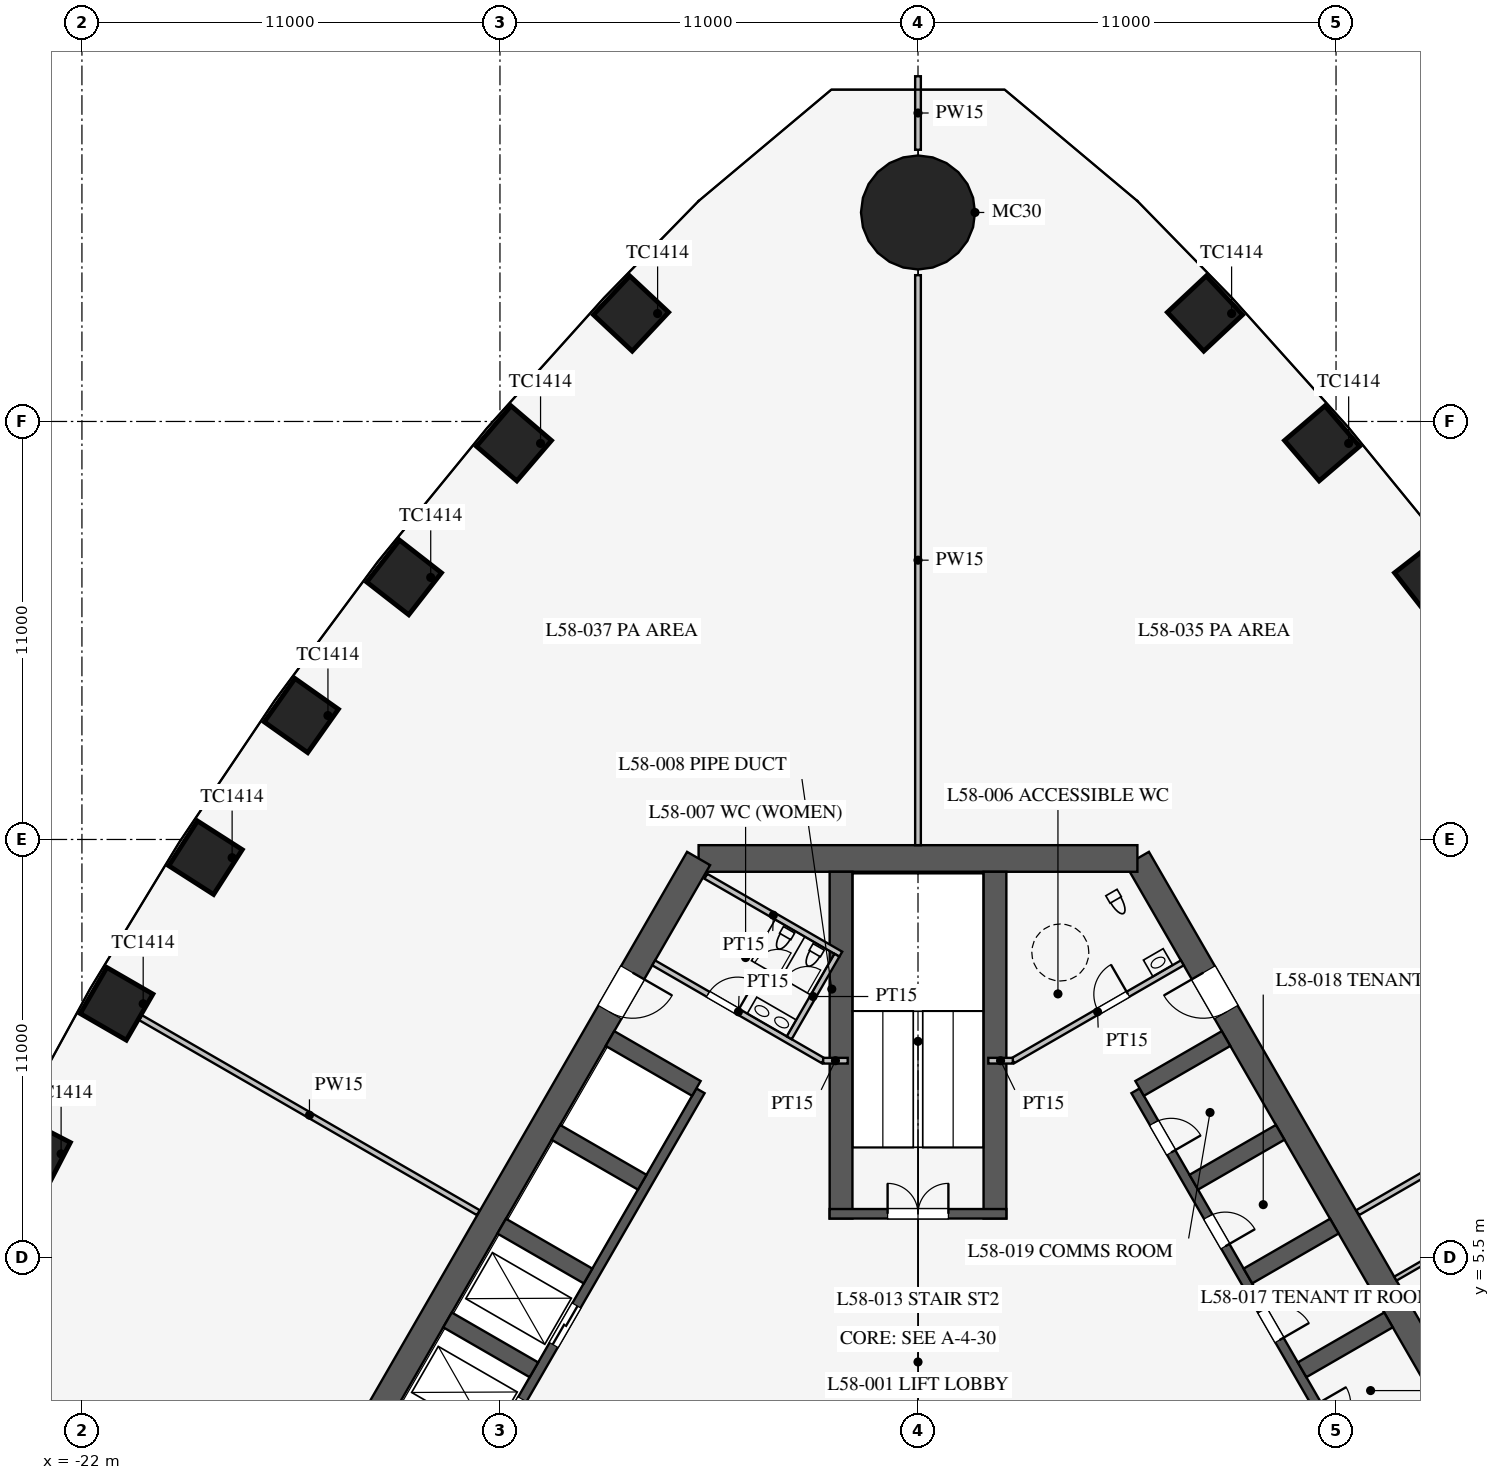
"""IFC4 building model, lengths in metres.
Left out: names, types, materials, properties, quantities, classifications, styles, units other than length and angle.
Written with IfcOpenShell. Run it as: python <this file> out.ifc"""

import sys

from ifc_helpers import new_model, si_unit, direction, frame, frame_2d, origin, origin_2d, place, context, subcontext, project, spatial, rectangle, circle, extrude, element, fill, save


model = new_model("IFC4")
c1 = context("Model", 3, precision=1e-05, world=origin(), true_north=direction((0.0, 1.0)))
c2 = subcontext(c1, "Body", "Model", "MODEL_VIEW")
j1 = project(units=[si_unit("LENGTHUNIT", "METRE"), si_unit("PLANEANGLEUNIT", "RADIAN")], contexts=[c1])
p1 = place(None, origin())
s1 = spatial("IfcSite", under=j1, at=p1, CompositionType="ELEMENT")
p2 = place(p1, origin())
s2 = spatial("IfcBuilding", under=s1, at=p2, CompositionType="ELEMENT")
p3 = place(p2, frame((0.0, 0.0, 252.7)))
s3 = spatial("IfcBuildingStorey", under=s2, at=p3, CompositionType="ELEMENT", Elevation=252.7)
for number, where, z_axis, x_axis in (
    (1, (13.522, 23.396, 0.0), (0.0, 0.0, 1.0), (-0.615, 0.789, 0.0)),
    (2, (10.632, 26.923, 0.0), (0.0, 0.0, 1.0), (-0.651, 0.759, 0.0)),
    (3, (7.552, 30.341, 0.0), (0.0, 0.0, 1.0), (-0.684, 0.73, 0.0)),
    (4, (-7.552, 30.341, 0.0), (0.0, 0.0, 1.0), (-0.684, -0.73, 0.0)),
    (5, (-10.632, 26.923, 0.0), (0.0, 0.0, 1.0), (-0.651, -0.759, 0.0)),
    (6, (-13.522, 23.396, 0.0), (0.0, 0.0, 1.0), (-0.615, -0.789, 0.0)),
    (7, (-16.227, 19.761, 0.0), (0.0, 0.0, 1.0), (-0.577, -0.816, 0.0)),
    (8, (-18.748, 16.02, 0.0), (0.0, 0.0, 1.0), (-0.539, -0.842, 0.0)),
    (9, (-21.088, 12.175, 0.0), (0.0, 0.0, 1.0), (-0.5, -0.866, 0.0)),
    (10, (-23.248, 8.226, 0.0), (0.0, 0.0, 1.0), (-0.46, -0.888, 0.0)),
):
    element("IfcColumn", number, at=place(p3, frame(where, z_axis=z_axis, x_axis=x_axis)), inside=s3, PredefinedType="COLUMN", context=c2, shape_type="SweptSolid", body=[
        extrude(rectangle(XDim=1.4, YDim=1.4, at=origin_2d()), origin(), (0.0, 0.0, 1.0), 4.2),
    ])
p4 = place(p3, frame((0.0, 33.0, 0.0), z_axis=(0.0, 0.0, 1.0), x_axis=(1.0, 0.0, 0.0)))
e11 = element("IfcColumn", 11, at=p4, inside=s3, PredefinedType="COLUMN", context=c2, shape_type="SweptSolid", body=[
    extrude(circle(Radius=1.5, at=origin_2d()), origin(), (0.0, 0.0, 1.0), 4.2),
])
p5 = place(p3, frame((16.743, -3.0, 0.0), z_axis=(0.0, 0.0, 1.0), x_axis=(-0.500002442456, 0.866023993627, 0.0)))
e12 = element("IfcWall", 12, at=p5, inside=s3, PredefinedType="SHEAR", context=c2, shape_type="SweptSolid", body=[
    extrude(rectangle(XDim=21.939, YDim=0.7, at=frame_2d((10.97, 0.0))), origin(), (0.0, 0.0, 1.0), 4.2),
])
p6 = place(p5, frame((17.27, 0.0, 0.0)))
e13 = element("IfcOpeningElement", 13, at=p6, cuts=e12, PredefinedType="OPENING", context=c2, shape_type="SweptSolid", body=[
    extrude(rectangle(XDim=1.2, YDim=2.1, at=frame_2d((0.6, 1.05))), frame((0.0, 0.36, 0.0), z_axis=(0.0, -1.0, 0.0), x_axis=(1.0, 0.0, 0.0)), (0.0, 0.0, 1.0), 0.72),
])
p7 = place(p5, frame((3.47, 0.0, 0.0)))
e14 = element("IfcOpeningElement", 14, at=p7, cuts=e12, PredefinedType="OPENING", context=c2, shape_type="SweptSolid", body=[
    extrude(rectangle(XDim=1.2, YDim=2.1, at=frame_2d((0.6, 1.05))), frame((0.0, 0.36, 0.0), z_axis=(0.0, -1.0, 0.0), x_axis=(1.0, 0.0, 0.0)), (0.0, 0.0, 1.0), 0.72),
])
p8 = place(p3, frame((5.773, 16.0, 0.0), z_axis=(0.0, 0.0, 1.0), x_axis=(-1.0, 0.0, 0.0)))
e15 = element("IfcWall", 15, at=p8, inside=s3, PredefinedType="SHEAR", context=c2, shape_type="SweptSolid", body=[
    extrude(rectangle(XDim=11.547, YDim=0.7, at=frame_2d((5.773, 0.0))), origin(), (0.0, 0.0, 1.0), 4.2),
])
p9 = place(p3, frame((-5.773, 16.0, 0.0), z_axis=(0.0, 0.0, 1.0), x_axis=(-0.500002442456, -0.866023993627, 0.0)))
e16 = element("IfcWall", 16, at=p9, inside=s3, PredefinedType="SHEAR", context=c2, shape_type="SweptSolid", body=[
    extrude(rectangle(XDim=21.939, YDim=0.7, at=frame_2d((10.97, 0.0))), origin(), (0.0, 0.0, 1.0), 4.2),
])
p10 = place(p9, frame((17.27, 0.0, 0.0)))
e17 = element("IfcOpeningElement", 17, at=p10, cuts=e16, PredefinedType="OPENING", context=c2, shape_type="SweptSolid", body=[
    extrude(rectangle(XDim=1.2, YDim=2.1, at=frame_2d((0.6, 1.05))), frame((0.0, 0.36, 0.0), z_axis=(0.0, -1.0, 0.0), x_axis=(1.0, 0.0, 0.0)), (0.0, 0.0, 1.0), 0.72),
])
p11 = place(p9, frame((3.47, 0.0, 0.0)))
e18 = element("IfcOpeningElement", 18, at=p11, cuts=e16, PredefinedType="OPENING", context=c2, shape_type="SweptSolid", body=[
    extrude(rectangle(XDim=1.2, YDim=2.1, at=frame_2d((0.6, 1.05))), frame((0.0, 0.36, 0.0), z_axis=(0.0, -1.0, 0.0), x_axis=(1.0, 0.0, 0.0)), (0.0, 0.0, 1.0), 0.72),
])
p12 = place(p3, frame((11.424, 0.014, 0.0), z_axis=(0.0, 0.0, 1.0), x_axis=(-0.500001763848, 0.866024385424, 0.0)))
e19 = element("IfcWall", 19, at=p12, inside=s3, PredefinedType="SHEAR", context=c2, shape_type="SweptSolid", body=[
    extrude(rectangle(XDim=11.4, YDim=0.25, at=frame_2d((5.7, 0.0))), origin(), (0.0, 0.0, 1.0), 4.2),
])
p13 = place(p12, frame((0.975, 0.0, 0.0)))
e20 = element("IfcOpeningElement", 20, at=p13, cuts=e19, PredefinedType="OPENING", context=c2, shape_type="SweptSolid", body=[
    extrude(rectangle(XDim=0.9, YDim=2.1, at=frame_2d((0.45, 1.05))), frame((0.0, 0.135, 0.0), z_axis=(0.0, -1.0, 0.0), x_axis=(1.0, 0.0, 0.0)), (0.0, 0.0, 1.0), 0.27),
])
p14 = place(p12, frame((3.825, 0.0, 0.0)))
e21 = element("IfcOpeningElement", 21, at=p14, cuts=e19, PredefinedType="OPENING", context=c2, shape_type="SweptSolid", body=[
    extrude(rectangle(XDim=0.9, YDim=2.1, at=frame_2d((0.45, 1.05))), frame((0.0, 0.135, 0.0), z_axis=(0.0, -1.0, 0.0), x_axis=(1.0, 0.0, 0.0)), (0.0, 0.0, 1.0), 0.27),
])
p15 = place(p12, frame((6.675, 0.0, 0.0)))
e22 = element("IfcOpeningElement", 22, at=p15, cuts=e19, PredefinedType="OPENING", context=c2, shape_type="SweptSolid", body=[
    extrude(rectangle(XDim=0.9, YDim=2.1, at=frame_2d((0.45, 1.05))), frame((0.0, 0.135, 0.0), z_axis=(0.0, -1.0, 0.0), x_axis=(1.0, 0.0, 0.0)), (0.0, 0.0, 1.0), 0.27),
])
p16 = place(p12, frame((9.525, 0.0, 0.0)))
e23 = element("IfcOpeningElement", 23, at=p16, cuts=e19, PredefinedType="OPENING", context=c2, shape_type="SweptSolid", body=[
    extrude(rectangle(XDim=0.9, YDim=2.1, at=frame_2d((0.45, 1.05))), frame((0.0, 0.135, 0.0), z_axis=(0.0, -1.0, 0.0), x_axis=(1.0, 0.0, 0.0)), (0.0, 0.0, 1.0), 0.27),
])
for number, where, z_axis, x_axis in (
    (24, (10.107, 2.544, 0.0), (0.0, 0.0, 1.0), (0.866, 0.5, 0.0)),
    (25, (8.682, 5.012, 0.0), (0.0, 0.0, 1.0), (0.866, 0.5, 0.0)),
    (26, (7.257, 7.481, 0.0), (0.0, 0.0, 1.0), (0.866, 0.5, 0.0)),
    (27, (5.832, 9.949, 0.0), (0.0, 0.0, 1.0), (0.866, 0.5, 0.0)),
):
    element("IfcWall", number, at=place(p3, frame(where, z_axis=z_axis, x_axis=x_axis)), inside=s3, PredefinedType="SHEAR", context=c2, shape_type="SweptSolid", body=[
        extrude(rectangle(XDim=2.625, YDim=0.45, at=frame_2d((1.312, 0.0))), origin(), (0.0, 0.0, 1.0), 4.2),
    ])
p17 = place(p3, frame((-5.724, 9.886, 0.0), z_axis=(0.0, 0.0, 1.0), x_axis=(-0.500001763848, -0.866024385424, 0.0)))
e28 = element("IfcWall", 28, at=p17, inside=s3, PredefinedType="SHEAR", context=c2, shape_type="SweptSolid", body=[
    extrude(rectangle(XDim=11.4, YDim=0.25, at=frame_2d((5.7, 0.0))), origin(), (0.0, 0.0, 1.0), 4.2),
])
p18 = place(p17, frame((6.525, 0.0, 0.0)))
e29 = element("IfcOpeningElement", 29, at=p18, cuts=e28, PredefinedType="OPENING", context=c2, shape_type="SweptSolid", body=[
    extrude(rectangle(XDim=1.2, YDim=2.2, at=frame_2d((0.6, 1.1))), frame((0.0, 0.135, 0.0), z_axis=(0.0, -1.0, 0.0), x_axis=(1.0, 0.0, 0.0)), (0.0, 0.0, 1.0), 0.27),
])
p19 = place(p17, frame((9.375, 0.0, 0.0)))
e30 = element("IfcOpeningElement", 30, at=p19, cuts=e28, PredefinedType="OPENING", context=c2, shape_type="SweptSolid", body=[
    extrude(rectangle(XDim=1.2, YDim=2.2, at=frame_2d((0.6, 1.1))), frame((0.0, 0.135, 0.0), z_axis=(0.0, -1.0, 0.0), x_axis=(1.0, 0.0, 0.0)), (0.0, 0.0, 1.0), 0.27),
])
for number, where, z_axis, x_axis in (
    (31, (-5.832, 9.949, 0.0), (0.0, 0.0, 1.0), (-0.866, 0.5, 0.0)),
    (32, (-7.257, 7.481, 0.0), (0.0, 0.0, 1.0), (-0.866, 0.5, 0.0)),
    (33, (-8.682, 5.012, 0.0), (0.0, 0.0, 1.0), (-0.866, 0.5, 0.0)),
    (34, (-10.107, 2.544, 0.0), (0.0, 0.0, 1.0), (-0.866, 0.5, 0.0)),
):
    element("IfcWall", number, at=place(p3, frame(where, z_axis=z_axis, x_axis=x_axis)), inside=s3, PredefinedType="SHEAR", context=c2, shape_type="SweptSolid", body=[
        extrude(rectangle(XDim=2.625, YDim=0.45, at=frame_2d((1.312, 0.0))), origin(), (0.0, 0.0, 1.0), 4.2),
    ])
for number, where, z_axis, x_axis in (
    (35, (2.025, 6.525, 0.0), (0.0, 0.0, 1.0), (0.0, 1.0, 0.0)),
    (36, (-2.025, 6.525, 0.0), (0.0, 0.0, 1.0), (0.0, 1.0, 0.0)),
):
    element("IfcWall", number, at=place(p3, frame(where, z_axis=z_axis, x_axis=x_axis)), inside=s3, PredefinedType="SHEAR", context=c2, shape_type="SweptSolid", body=[
        extrude(rectangle(XDim=9.125, YDim=0.6, at=frame_2d((4.562, 0.0))), origin(), (0.0, 0.0, 1.0), 4.2),
    ])
p20 = place(p3, frame((2.325, 6.65, 0.0), z_axis=(0.0, 0.0, 1.0), x_axis=(-1.0, 0.0, 0.0)))
e37 = element("IfcWall", 37, at=p20, inside=s3, PredefinedType="SHEAR", context=c2, shape_type="SweptSolid", body=[
    extrude(rectangle(XDim=4.65, YDim=0.25, at=frame_2d((2.325, 0.0))), origin(), (0.0, 0.0, 1.0), 4.2),
])
p21 = place(p20, frame((1.525, 0.0, 0.0)))
e38 = element("IfcOpeningElement", 38, at=p21, cuts=e37, PredefinedType="OPENING", context=c2, shape_type="SweptSolid", body=[
    extrude(rectangle(XDim=1.6, YDim=2.1, at=frame_2d((0.8, 1.05))), frame((0.0, 0.135, 0.0), z_axis=(0.0, -1.0, 0.0), x_axis=(1.0, 0.0, 0.0)), (0.0, 0.0, 1.0), 0.27),
])
p22 = place(p3, frame((2.495, 10.678, 0.0), z_axis=(0.0, 0.0, 1.0), x_axis=(0.866037967349, 0.499978238636, 0.0)))
e39 = element("IfcWall", 39, at=p22, inside=s3, PredefinedType="PARTITIONING", context=c2, shape_type="SweptSolid", body=[
    extrude(rectangle(XDim=5.15, YDim=0.15, at=frame_2d((2.575, 0.0))), origin(), (0.0, 0.0, 1.0), 4.0),
])
p23 = place(p22, frame((2.6, 0.0, 0.0)))
e40 = element("IfcOpeningElement", 40, at=p23, cuts=e39, PredefinedType="OPENING", context=c2, shape_type="SweptSolid", body=[
    extrude(rectangle(XDim=0.9, YDim=2.1, at=frame_2d((0.45, 1.05))), frame((0.0, 0.085, 0.0), z_axis=(0.0, -1.0, 0.0), x_axis=(1.0, 0.0, 0.0)), (0.0, 0.0, 1.0), 0.17),
])
p24 = place(p3, frame((-2.495, 10.678, 0.0), z_axis=(0.0, 0.0, 1.0), x_axis=(-0.866037967349, 0.499978238636, 0.0)))
e41 = element("IfcWall", 41, at=p24, inside=s3, PredefinedType="PARTITIONING", context=c2, shape_type="SweptSolid", body=[
    extrude(rectangle(XDim=5.15, YDim=0.15, at=frame_2d((2.575, 0.0))), origin(), (0.0, 0.0, 1.0), 4.0),
])
p25 = place(p24, frame((2.6, 0.0, 0.0)))
e42 = element("IfcOpeningElement", 42, at=p25, cuts=e41, PredefinedType="OPENING", context=c2, shape_type="SweptSolid", body=[
    extrude(rectangle(XDim=0.9, YDim=2.1, at=frame_2d((0.45, 1.05))), frame((0.0, 0.085, 0.0), z_axis=(0.0, -1.0, 0.0), x_axis=(1.0, 0.0, 0.0)), (0.0, 0.0, 1.0), 0.17),
])
for number, where, z_axis, x_axis in (
    (43, (2.495, 10.678, 0.0), (0.0, 0.0, 1.0), (-1.0, 0.0, 0.0)),
    (44, (-2.495, 10.678, 0.0), (0.0, 0.0, 1.0), (1.0, 0.0, 0.0)),
):
    element("IfcWall", number, at=place(p3, frame(where, z_axis=z_axis, x_axis=x_axis)), inside=s3, PredefinedType="PARTITIONING", context=c2, shape_type="SweptSolid", body=[
        extrude(rectangle(XDim=0.645, YDim=0.15, at=frame_2d((0.323, 0.0))), origin(), (0.0, 0.0, 1.0), 4.0),
    ])
p26 = place(p3, frame((-2.031, 13.482, 0.0), z_axis=(0.0, 0.0, 1.0), x_axis=(-0.866050731258, 0.499956128963, 0.0)))
e45 = element("IfcWall", 45, at=p26, inside=s3, PredefinedType="PARTITIONING", context=c2, shape_type="SweptSolid", body=[
    extrude(rectangle(XDim=4.1, YDim=0.15, at=frame_2d((2.05, 0.0))), origin(), (0.0, 0.0, 1.0), 4.0),
])
p27 = place(p3, frame((-3.389, 11.281, 0.0), z_axis=(0.0, 0.0, 1.0), x_axis=(0.499989096993, 0.866031698547, 0.0)))
e46 = element("IfcWall", 46, at=p27, inside=s3, PredefinedType="PARTITIONING", context=c2, shape_type="SweptSolid", body=[
    extrude(rectangle(XDim=2.51, YDim=0.15, at=frame_2d((1.255, 0.0))), origin(), (0.0, 0.0, 1.0), 4.0),
])
p28 = place(p3, frame((0.0, 16.35, 0.0), z_axis=(0.0, 0.0, 1.0), x_axis=(0.0, 1.0, 0.0)))
e47 = element("IfcWall", 47, at=p28, inside=s3, PredefinedType="PARTITIONING", context=c2, shape_type="SweptSolid", body=[
    extrude(rectangle(XDim=15.0, YDim=0.15, at=frame_2d((7.5, 0.0))), origin(), (0.0, 0.0, 1.0), 2.4),
])
p29 = place(p3, frame((0.0, 34.65, 0.0), z_axis=(0.0, 0.0, 1.0), x_axis=(0.0, 1.0, 0.0)))
e48 = element("IfcWall", 48, at=p29, inside=s3, PredefinedType="PARTITIONING", context=c2, shape_type="SweptSolid", body=[
    extrude(rectangle(XDim=1.935, YDim=0.15, at=frame_2d((0.967, 0.0))), origin(), (0.0, 0.0, 1.0), 2.4),
])
p30 = place(p3, frame((11.57, 6.68, 0.0), z_axis=(0.0, 0.0, 1.0), x_axis=(0.866023526028, 0.500003252355, 0.0)))
e49 = element("IfcWall", 49, at=p30, inside=s3, PredefinedType="PARTITIONING", context=c2, shape_type="SweptSolid", body=[
    extrude(rectangle(XDim=10.261, YDim=0.15, at=frame_2d((5.13, 0.0))), origin(), (0.0, 0.0, 1.0), 2.992),
])
p31 = place(p3, frame((12.562, 4.943, 0.0), z_axis=(0.0, 0.0, 1.0), x_axis=(0.866026010844, 0.49999894854, 0.0)))
e50 = element("IfcWall", 50, at=p31, inside=s3, PredefinedType="PARTITIONING", context=c2, shape_type="SweptSolid", body=[
    extrude(rectangle(XDim=4.0, YDim=0.12, at=frame_2d((2.0, 0.0))), origin(), (0.0, 0.0, 1.0), 2.9),
])
p32 = place(p3, frame((-11.57, 6.68, 0.0), z_axis=(0.0, 0.0, 1.0), x_axis=(-0.866023526028, 0.500003252355, 0.0)))
e51 = element("IfcWall", 51, at=p32, inside=s3, PredefinedType="PARTITIONING", context=c2, shape_type="SweptSolid", body=[
    extrude(rectangle(XDim=10.261, YDim=0.15, at=frame_2d((5.13, 0.0))), origin(), (0.0, 0.0, 1.0), 2.992),
])
p33 = place(p23, origin())
e52 = element("IfcDoor", 52, at=p33, inside=s3, OperationType="SINGLE_SWING_RIGHT", PredefinedType="DOOR", context=c2, shape_type="SweptSolid", body=[
    extrude(rectangle(XDim=0.9, YDim=2.1, at=frame_2d((0.45, 1.05))), frame((0.0, 0.025, 0.0), z_axis=(0.0, -1.0, 0.0), x_axis=(1.0, 0.0, 0.0)), (0.0, 0.0, 1.0), 0.05),
])
fill(e40, e52)
p34 = place(p25, frame((0.9, 0.0, 0.0), z_axis=(0.0, 0.0, 1.0), x_axis=(-1.0, 0.0, 0.0)))
e53 = element("IfcDoor", 53, at=p34, inside=s3, OperationType="SINGLE_SWING_RIGHT", PredefinedType="DOOR", context=c2, shape_type="SweptSolid", body=[
    extrude(rectangle(XDim=0.9, YDim=2.1, at=frame_2d((0.45, 1.05))), frame((0.0, 0.025, 0.0), z_axis=(0.0, -1.0, 0.0), x_axis=(1.0, 0.0, 0.0)), (0.0, 0.0, 1.0), 0.05),
])
fill(e42, e53)
p35 = place(p21, frame((1.6, 0.0, 0.0), z_axis=(0.0, 0.0, 1.0), x_axis=(-1.0, 0.0, 0.0)))
e54 = element("IfcDoor", 54, at=p35, inside=s3, OperationType="DOUBLE_DOOR_SINGLE_SWING", PredefinedType="DOOR", context=c2, shape_type="SweptSolid", body=[
    extrude(rectangle(XDim=1.6, YDim=2.1, at=frame_2d((0.8, 1.05))), frame((0.0, 0.025, 0.0), z_axis=(0.0, -1.0, 0.0), x_axis=(1.0, 0.0, 0.0)), (0.0, 0.0, 1.0), 0.05),
])
fill(e38, e54)
p36 = place(p6, origin())
e55 = element("IfcDoor", 55, at=p36, inside=s3, OperationType="SINGLE_SWING_RIGHT", PredefinedType="DOOR", context=c2, shape_type="SweptSolid", body=[
    extrude(rectangle(XDim=1.2, YDim=2.1, at=frame_2d((0.6, 1.05))), frame((0.0, 0.025, 0.0), z_axis=(0.0, -1.0, 0.0), x_axis=(1.0, 0.0, 0.0)), (0.0, 0.0, 1.0), 0.05),
])
fill(e13, e55)
p37 = place(p11, origin())
e56 = element("IfcDoor", 56, at=p37, inside=s3, OperationType="SINGLE_SWING_LEFT", PredefinedType="DOOR", context=c2, shape_type="SweptSolid", body=[
    extrude(rectangle(XDim=1.2, YDim=2.1, at=frame_2d((0.6, 1.05))), frame((0.0, 0.025, 0.0), z_axis=(0.0, -1.0, 0.0), x_axis=(1.0, 0.0, 0.0)), (0.0, 0.0, 1.0), 0.05),
])
fill(e18, e56)
p38 = place(p14, frame((0.9, 0.0, 0.0), z_axis=(0.0, 0.0, 1.0), x_axis=(-1.0, 0.0, 0.0)))
e57 = element("IfcDoor", 57, at=p38, inside=s3, OperationType="SINGLE_SWING_RIGHT", PredefinedType="DOOR", context=c2, shape_type="SweptSolid", body=[
    extrude(rectangle(XDim=0.9, YDim=2.1, at=frame_2d((0.45, 1.05))), frame((0.0, 0.025, 0.0), z_axis=(0.0, -1.0, 0.0), x_axis=(1.0, 0.0, 0.0)), (0.0, 0.0, 1.0), 0.05),
])
fill(e21, e57)
p39 = place(p15, frame((0.9, 0.0, 0.0), z_axis=(0.0, 0.0, 1.0), x_axis=(-1.0, 0.0, 0.0)))
e58 = element("IfcDoor", 58, at=p39, inside=s3, OperationType="SINGLE_SWING_RIGHT", PredefinedType="DOOR", context=c2, shape_type="SweptSolid", body=[
    extrude(rectangle(XDim=0.9, YDim=2.1, at=frame_2d((0.45, 1.05))), frame((0.0, 0.025, 0.0), z_axis=(0.0, -1.0, 0.0), x_axis=(1.0, 0.0, 0.0)), (0.0, 0.0, 1.0), 0.05),
])
fill(e22, e58)
p40 = place(p16, frame((0.9, 0.0, 0.0), z_axis=(0.0, 0.0, 1.0), x_axis=(-1.0, 0.0, 0.0)))
e59 = element("IfcDoor", 59, at=p40, inside=s3, OperationType="SINGLE_SWING_RIGHT", PredefinedType="DOOR", context=c2, shape_type="SweptSolid", body=[
    extrude(rectangle(XDim=0.9, YDim=2.1, at=frame_2d((0.45, 1.05))), frame((0.0, 0.025, 0.0), z_axis=(0.0, -1.0, 0.0), x_axis=(1.0, 0.0, 0.0)), (0.0, 0.0, 1.0), 0.05),
])
fill(e23, e59)
p41 = place(p18, origin())
e60 = element("IfcDoor", 60, at=p41, inside=s3, OperationType="DOUBLE_DOOR_SLIDING", PredefinedType="DOOR", context=c2, shape_type="SweptSolid", body=[
    extrude(rectangle(XDim=1.2, YDim=2.2, at=frame_2d((0.6, 1.1))), frame((0.0, 0.025, 0.0), z_axis=(0.0, -1.0, 0.0), x_axis=(1.0, 0.0, 0.0)), (0.0, 0.0, 1.0), 0.05),
])
fill(e29, e60)
p42 = place(p19, origin())
e61 = element("IfcDoor", 61, at=p42, inside=s3, OperationType="DOUBLE_DOOR_SLIDING", PredefinedType="DOOR", context=c2, shape_type="SweptSolid", body=[
    extrude(rectangle(XDim=1.2, YDim=2.2, at=frame_2d((0.6, 1.1))), frame((0.0, 0.025, 0.0), z_axis=(0.0, -1.0, 0.0), x_axis=(1.0, 0.0, 0.0)), (0.0, 0.0, 1.0), 0.05),
])
fill(e30, e61)
save(model, sys.argv[1])
